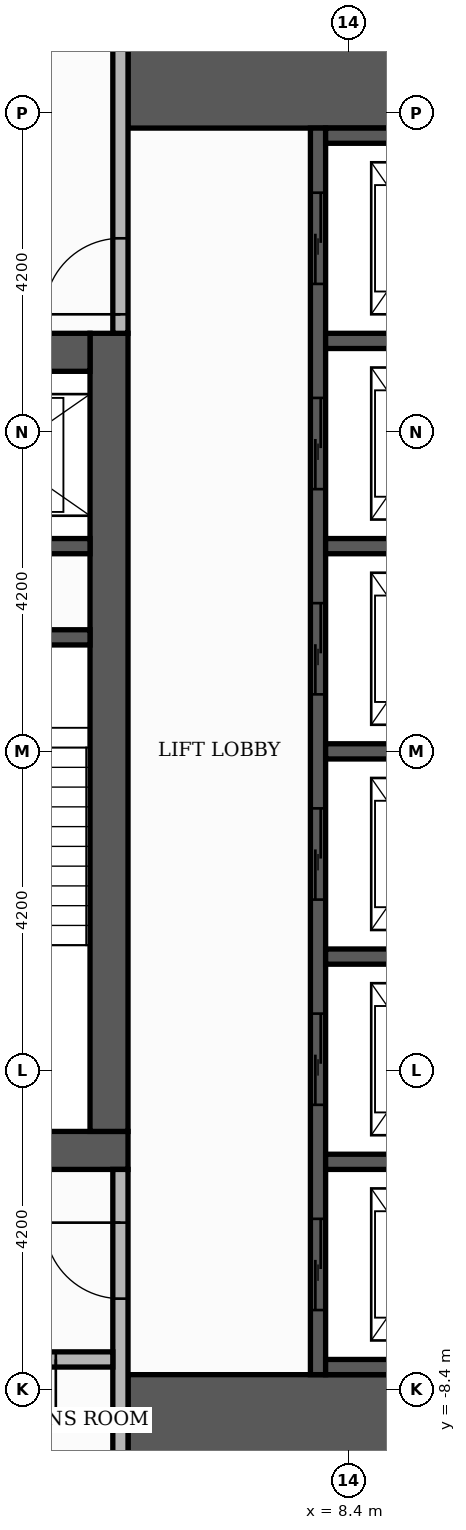
"""IFC4 building model, lengths in metres.
Left out: names, types, materials, properties, quantities, classifications, styles, units other than length and angle.
Written with IfcOpenShell. Run it as: python <this file> out.ifc"""

import sys

from ifc_helpers import new_model, si_unit, direction, frame, frame_2d, origin, place, context, subcontext, project, spatial, rectangle, extrude, element, fill, save


model = new_model("IFC4")
c1 = context("Model", 3, precision=1e-05, world=origin(), true_north=direction((0.0, 1.0)))
c2 = subcontext(c1, "Body", "Model", "MODEL_VIEW")
j1 = project(units=[si_unit("LENGTHUNIT", "METRE"), si_unit("PLANEANGLEUNIT", "RADIAN")], contexts=[c1])
p1 = place(None, origin())
s1 = spatial("IfcSite", under=j1, at=p1, CompositionType="ELEMENT")
p2 = place(p1, origin())
s2 = spatial("IfcBuilding", under=s1, at=p2, CompositionType="ELEMENT")
p3 = place(p2, frame((0.0, 0.0, 172.8)))
s3 = spatial("IfcBuildingStorey", under=s2, at=p3, CompositionType="ELEMENT", Elevation=172.8)
p4 = place(p3, frame((-5.5, -5.25, 0.0), z_axis=(0.0, 0.0, 1.0), x_axis=(1.0, 0.0, 0.0)))
e1 = element("IfcWall", 1, at=p4, inside=s3, PredefinedType="SHEAR", context=c2, shape_type="SweptSolid", body=[
    extrude(rectangle(XDim=11.0, YDim=0.5, at=frame_2d((5.5, 0.0))), origin(), (0.0, 0.0, 1.0), 3.48),
])
p5 = place(p4, frame((4.9, 0.0, 0.0)))
e2 = element("IfcOpeningElement", 2, at=p5, cuts=e1, PredefinedType="OPENING", context=c2, shape_type="SweptSolid", body=[
    extrude(rectangle(XDim=1.2, YDim=2.1, at=frame_2d((0.6, 1.05))), frame((0.0, 0.26, 0.0), z_axis=(0.0, -1.0, 0.0), x_axis=(1.0, 0.0, 0.0)), (0.0, 0.0, 1.0), 0.52),
])
p6 = place(p3, frame((5.25, -5.0, 0.0), z_axis=(0.0, 0.0, 1.0), x_axis=(0.0, 1.0, 0.0)))
e3 = element("IfcWall", 3, at=p6, inside=s3, PredefinedType="SHEAR", context=c2, shape_type="SweptSolid", body=[
    extrude(rectangle(XDim=10.5, YDim=0.5, at=frame_2d((5.25, 0.0))), origin(), (0.0, 0.0, 1.0), 3.48),
])
p7 = place(p3, frame((-5.0, 5.25, 0.0), z_axis=(0.0, 0.0, 1.0), x_axis=(1.0, 0.0, 0.0)))
e4 = element("IfcWall", 4, at=p7, inside=s3, PredefinedType="SHEAR", context=c2, shape_type="SweptSolid", body=[
    extrude(rectangle(XDim=10.0, YDim=0.5, at=frame_2d((5.0, 0.0))), origin(), (0.0, 0.0, 1.0), 3.48),
])
p8 = place(p7, frame((4.4, 0.0, 0.0)))
e5 = element("IfcOpeningElement", 5, at=p8, cuts=e4, PredefinedType="OPENING", context=c2, shape_type="SweptSolid", body=[
    extrude(rectangle(XDim=1.2, YDim=2.1, at=frame_2d((0.6, 1.05))), frame((0.0, 0.26, 0.0), z_axis=(0.0, -1.0, 0.0), x_axis=(1.0, 0.0, 0.0)), (0.0, 0.0, 1.0), 0.52),
])
for number, where, z_axis, x_axis in (
    (6, (5.5, -9.15, 0.0), (0.0, 0.0, 1.0), (1.0, 0.0, 0.0)),
    (7, (5.5, 9.15, 0.0), (0.0, 0.0, 1.0), (1.0, 0.0, 0.0)),
):
    element("IfcWall", number, at=place(p3, frame(where, z_axis=z_axis, x_axis=x_axis)), inside=s3, PredefinedType="SHEAR", context=c2, shape_type="SweptSolid", body=[
        extrude(rectangle(XDim=4.6, YDim=1.9, at=frame_2d((2.3, 0.0))), origin(), (0.0, 0.0, 1.0), 3.48),
    ])
p9 = place(p3, frame((2.15, 1.5, 0.0), z_axis=(0.0, 0.0, 1.0), x_axis=(1.0, 0.0, 0.0)))
e8 = element("IfcWall", 8, at=p9, inside=s3, PredefinedType="SHEAR", context=c2, shape_type="SweptSolid", body=[
    extrude(rectangle(XDim=2.85, YDim=0.2, at=frame_2d((1.425, 0.0))), origin(), (0.0, 0.0, 1.0), 3.48),
])
p10 = place(p3, frame((8.0, -8.2, 0.0), z_axis=(0.0, 0.0, 1.0), x_axis=(0.0, 1.0, 0.0)))
e9 = element("IfcWall", 9, at=p10, inside=s3, PredefinedType="SHEAR", context=c2, shape_type="SweptSolid", body=[
    extrude(rectangle(XDim=16.4, YDim=0.2, at=frame_2d((8.2, 0.0))), origin(), (0.0, 0.0, 1.0), 3.48),
])
p11 = place(p10, frame((0.85, 0.0, 0.0)))
e10 = element("IfcOpeningElement", 10, at=p11, cuts=e9, PredefinedType="OPENING", context=c2, shape_type="SweptSolid", body=[
    extrude(rectangle(XDim=1.2, YDim=2.1, at=frame_2d((0.6, 1.05))), frame((0.0, 0.11, 0.0), z_axis=(0.0, -1.0, 0.0), x_axis=(1.0, 0.0, 0.0)), (0.0, 0.0, 1.0), 0.22),
])
p12 = place(p10, frame((3.55, 0.0, 0.0)))
e11 = element("IfcOpeningElement", 11, at=p12, cuts=e9, PredefinedType="OPENING", context=c2, shape_type="SweptSolid", body=[
    extrude(rectangle(XDim=1.2, YDim=2.1, at=frame_2d((0.6, 1.05))), frame((0.0, 0.11, 0.0), z_axis=(0.0, -1.0, 0.0), x_axis=(1.0, 0.0, 0.0)), (0.0, 0.0, 1.0), 0.22),
])
p13 = place(p10, frame((6.25, 0.0, 0.0)))
e12 = element("IfcOpeningElement", 12, at=p13, cuts=e9, PredefinedType="OPENING", context=c2, shape_type="SweptSolid", body=[
    extrude(rectangle(XDim=1.2, YDim=2.1, at=frame_2d((0.6, 1.05))), frame((0.0, 0.11, 0.0), z_axis=(0.0, -1.0, 0.0), x_axis=(1.0, 0.0, 0.0)), (0.0, 0.0, 1.0), 0.22),
])
p14 = place(p10, frame((8.95, 0.0, 0.0)))
e13 = element("IfcOpeningElement", 13, at=p14, cuts=e9, PredefinedType="OPENING", context=c2, shape_type="SweptSolid", body=[
    extrude(rectangle(XDim=1.2, YDim=2.1, at=frame_2d((0.6, 1.05))), frame((0.0, 0.11, 0.0), z_axis=(0.0, -1.0, 0.0), x_axis=(1.0, 0.0, 0.0)), (0.0, 0.0, 1.0), 0.22),
])
p15 = place(p10, frame((11.65, 0.0, 0.0)))
e14 = element("IfcOpeningElement", 14, at=p15, cuts=e9, PredefinedType="OPENING", context=c2, shape_type="SweptSolid", body=[
    extrude(rectangle(XDim=1.2, YDim=2.1, at=frame_2d((0.6, 1.05))), frame((0.0, 0.11, 0.0), z_axis=(0.0, -1.0, 0.0), x_axis=(1.0, 0.0, 0.0)), (0.0, 0.0, 1.0), 0.22),
])
p16 = place(p10, frame((14.35, 0.0, 0.0)))
e15 = element("IfcOpeningElement", 15, at=p16, cuts=e9, PredefinedType="OPENING", context=c2, shape_type="SweptSolid", body=[
    extrude(rectangle(XDim=1.2, YDim=2.1, at=frame_2d((0.6, 1.05))), frame((0.0, 0.11, 0.0), z_axis=(0.0, -1.0, 0.0), x_axis=(1.0, 0.0, 0.0)), (0.0, 0.0, 1.0), 0.22),
])
for number, where, z_axis, x_axis in (
    (16, (8.1, -8.1, 0.0), (0.0, 0.0, 1.0), (1.0, 0.0, 0.0)),
    (17, (8.1, -5.4, 0.0), (0.0, 0.0, 1.0), (1.0, 0.0, 0.0)),
    (18, (8.1, -2.7, 0.0), (0.0, 0.0, 1.0), (1.0, 0.0, 0.0)),
    (19, (8.1, 0.0, 0.0), (0.0, 0.0, 1.0), (1.0, 0.0, 0.0)),
):
    element("IfcWall", number, at=place(p3, frame(where, z_axis=z_axis, x_axis=x_axis)), inside=s3, PredefinedType="SHEAR", context=c2, shape_type="SweptSolid", body=[
        extrude(rectangle(XDim=2.0, YDim=0.2, at=frame_2d((1.0, 0.0))), origin(), (0.0, 0.0, 1.0), 3.48),
    ])
p17 = place(p3, frame((2.15, 2.7, 0.0), z_axis=(0.0, 0.0, 1.0), x_axis=(1.0, 0.0, 0.0)))
e20 = element("IfcWall", 20, at=p17, inside=s3, PredefinedType="SHEAR", context=c2, shape_type="SweptSolid", body=[
    extrude(rectangle(XDim=2.85, YDim=0.2, at=frame_2d((1.425, 0.0))), origin(), (0.0, 0.0, 1.0), 3.48),
])
for number, where, z_axis, x_axis in (
    (21, (8.1, 2.7, 0.0), (0.0, 0.0, 1.0), (1.0, 0.0, 0.0)),
    (22, (8.1, 5.4, 0.0), (0.0, 0.0, 1.0), (1.0, 0.0, 0.0)),
    (23, (8.1, 8.1, 0.0), (0.0, 0.0, 1.0), (1.0, 0.0, 0.0)),
):
    element("IfcWall", number, at=place(p3, frame(where, z_axis=z_axis, x_axis=x_axis)), inside=s3, PredefinedType="SHEAR", context=c2, shape_type="SweptSolid", body=[
        extrude(rectangle(XDim=2.0, YDim=0.2, at=frame_2d((1.0, 0.0))), origin(), (0.0, 0.0, 1.0), 3.48),
    ])
p18 = place(p3, frame((5.4, -10.1, 0.0), z_axis=(0.0, 0.0, 1.0), x_axis=(0.0, 1.0, 0.0)))
e24 = element("IfcWall", 24, at=p18, inside=s3, PredefinedType="PARTITIONING", context=c2, shape_type="SweptSolid", body=[
    extrude(rectangle(XDim=4.6, YDim=0.2, at=frame_2d((2.3, 0.0))), origin(), (0.0, 0.0, 1.0), 3.48),
])
p19 = place(p18, frame((2.9, 0.0, 0.0)))
e25 = element("IfcOpeningElement", 25, at=p19, cuts=e24, PredefinedType="OPENING", context=c2, shape_type="SweptSolid", body=[
    extrude(rectangle(XDim=1.0, YDim=2.1, at=frame_2d((0.5, 1.05))), frame((0.0, 0.11, 0.0), z_axis=(0.0, -1.0, 0.0), x_axis=(1.0, 0.0, 0.0)), (0.0, 0.0, 1.0), 0.22),
])
p20 = place(p3, frame((2.95, -8.0, 0.0), z_axis=(0.0, 0.0, 1.0), x_axis=(1.0, 0.0, 0.0)))
e26 = element("IfcWall", 26, at=p20, inside=s3, PredefinedType="PARTITIONING", context=c2, shape_type="SweptSolid", body=[
    extrude(rectangle(XDim=2.35, YDim=0.2, at=frame_2d((1.175, 0.0))), origin(), (0.0, 0.0, 1.0), 3.48),
])
p21 = place(p20, frame((0.7, 0.0, 0.0)))
e27 = element("IfcOpeningElement", 27, at=p21, cuts=e26, PredefinedType="OPENING", context=c2, shape_type="SweptSolid", body=[
    extrude(rectangle(XDim=0.9, YDim=2.1, at=frame_2d((0.45, 1.05))), frame((0.0, 0.11, 0.0), z_axis=(0.0, -1.0, 0.0), x_axis=(1.0, 0.0, 0.0)), (0.0, 0.0, 1.0), 0.22),
])
p22 = place(p3, frame((5.4, 5.5, 0.0), z_axis=(0.0, 0.0, 1.0), x_axis=(0.0, 1.0, 0.0)))
e28 = element("IfcWall", 28, at=p22, inside=s3, PredefinedType="PARTITIONING", context=c2, shape_type="SweptSolid", body=[
    extrude(rectangle(XDim=4.6, YDim=0.2, at=frame_2d((2.3, 0.0))), origin(), (0.0, 0.0, 1.0), 3.48),
])
p23 = place(p22, frame((0.25, 0.0, 0.0)))
e29 = element("IfcOpeningElement", 29, at=p23, cuts=e28, PredefinedType="OPENING", context=c2, shape_type="SweptSolid", body=[
    extrude(rectangle(XDim=1.0, YDim=2.1, at=frame_2d((0.5, 1.05))), frame((0.0, 0.11, 0.0), z_axis=(0.0, -1.0, 0.0), x_axis=(1.0, 0.0, 0.0)), (0.0, 0.0, 1.0), 0.22),
])
p24 = place(p11, origin())
e30 = element("IfcDoor", 30, at=p24, inside=s3, OperationType="SLIDING_TO_LEFT", PredefinedType="DOOR", context=c2, shape_type="SweptSolid", body=[
    extrude(rectangle(XDim=1.2, YDim=2.1, at=frame_2d((0.6, 1.05))), frame((0.0, 0.025, 0.0), z_axis=(0.0, -1.0, 0.0), x_axis=(1.0, 0.0, 0.0)), (0.0, 0.0, 1.0), 0.05),
])
fill(e10, e30)
p25 = place(p12, origin())
e31 = element("IfcDoor", 31, at=p25, inside=s3, OperationType="SLIDING_TO_LEFT", PredefinedType="DOOR", context=c2, shape_type="SweptSolid", body=[
    extrude(rectangle(XDim=1.2, YDim=2.1, at=frame_2d((0.6, 1.05))), frame((0.0, 0.025, 0.0), z_axis=(0.0, -1.0, 0.0), x_axis=(1.0, 0.0, 0.0)), (0.0, 0.0, 1.0), 0.05),
])
fill(e11, e31)
p26 = place(p13, origin())
e32 = element("IfcDoor", 32, at=p26, inside=s3, OperationType="SLIDING_TO_LEFT", PredefinedType="DOOR", context=c2, shape_type="SweptSolid", body=[
    extrude(rectangle(XDim=1.2, YDim=2.1, at=frame_2d((0.6, 1.05))), frame((0.0, 0.025, 0.0), z_axis=(0.0, -1.0, 0.0), x_axis=(1.0, 0.0, 0.0)), (0.0, 0.0, 1.0), 0.05),
])
fill(e12, e32)
p27 = place(p14, origin())
e33 = element("IfcDoor", 33, at=p27, inside=s3, OperationType="SLIDING_TO_LEFT", PredefinedType="DOOR", context=c2, shape_type="SweptSolid", body=[
    extrude(rectangle(XDim=1.2, YDim=2.1, at=frame_2d((0.6, 1.05))), frame((0.0, 0.025, 0.0), z_axis=(0.0, -1.0, 0.0), x_axis=(1.0, 0.0, 0.0)), (0.0, 0.0, 1.0), 0.05),
])
fill(e13, e33)
p28 = place(p15, origin())
e34 = element("IfcDoor", 34, at=p28, inside=s3, OperationType="SLIDING_TO_LEFT", PredefinedType="DOOR", context=c2, shape_type="SweptSolid", body=[
    extrude(rectangle(XDim=1.2, YDim=2.1, at=frame_2d((0.6, 1.05))), frame((0.0, 0.025, 0.0), z_axis=(0.0, -1.0, 0.0), x_axis=(1.0, 0.0, 0.0)), (0.0, 0.0, 1.0), 0.05),
])
fill(e14, e34)
p29 = place(p16, origin())
e35 = element("IfcDoor", 35, at=p29, inside=s3, OperationType="SLIDING_TO_LEFT", PredefinedType="DOOR", context=c2, shape_type="SweptSolid", body=[
    extrude(rectangle(XDim=1.2, YDim=2.1, at=frame_2d((0.6, 1.05))), frame((0.0, 0.025, 0.0), z_axis=(0.0, -1.0, 0.0), x_axis=(1.0, 0.0, 0.0)), (0.0, 0.0, 1.0), 0.05),
])
fill(e15, e35)
p30 = place(p23, origin())
e36 = element("IfcDoor", 36, at=p30, inside=s3, OperationType="SINGLE_SWING_LEFT", PredefinedType="DOOR", context=c2, shape_type="SweptSolid", body=[
    extrude(rectangle(XDim=1.0, YDim=2.1, at=frame_2d((0.5, 1.05))), frame((0.0, 0.025, 0.0), z_axis=(0.0, -1.0, 0.0), x_axis=(1.0, 0.0, 0.0)), (0.0, 0.0, 1.0), 0.05),
])
fill(e29, e36)
p31 = place(p19, origin())
e37 = element("IfcDoor", 37, at=p31, inside=s3, OperationType="SINGLE_SWING_RIGHT", PredefinedType="DOOR", context=c2, shape_type="SweptSolid", body=[
    extrude(rectangle(XDim=1.0, YDim=2.1, at=frame_2d((0.5, 1.05))), frame((0.0, 0.025, 0.0), z_axis=(0.0, -1.0, 0.0), x_axis=(1.0, 0.0, 0.0)), (0.0, 0.0, 1.0), 0.05),
])
fill(e25, e37)
p32 = place(p21, frame((0.9, 0.0, 0.0), z_axis=(0.0, 0.0, 1.0), x_axis=(-1.0, 0.0, 0.0)))
e38 = element("IfcDoor", 38, at=p32, inside=s3, OperationType="SINGLE_SWING_RIGHT", PredefinedType="DOOR", context=c2, shape_type="SweptSolid", body=[
    extrude(rectangle(XDim=0.9, YDim=2.1, at=frame_2d((0.45, 1.05))), frame((0.0, 0.025, 0.0), z_axis=(0.0, -1.0, 0.0), x_axis=(1.0, 0.0, 0.0)), (0.0, 0.0, 1.0), 0.05),
])
fill(e27, e38)
save(model, sys.argv[1])
